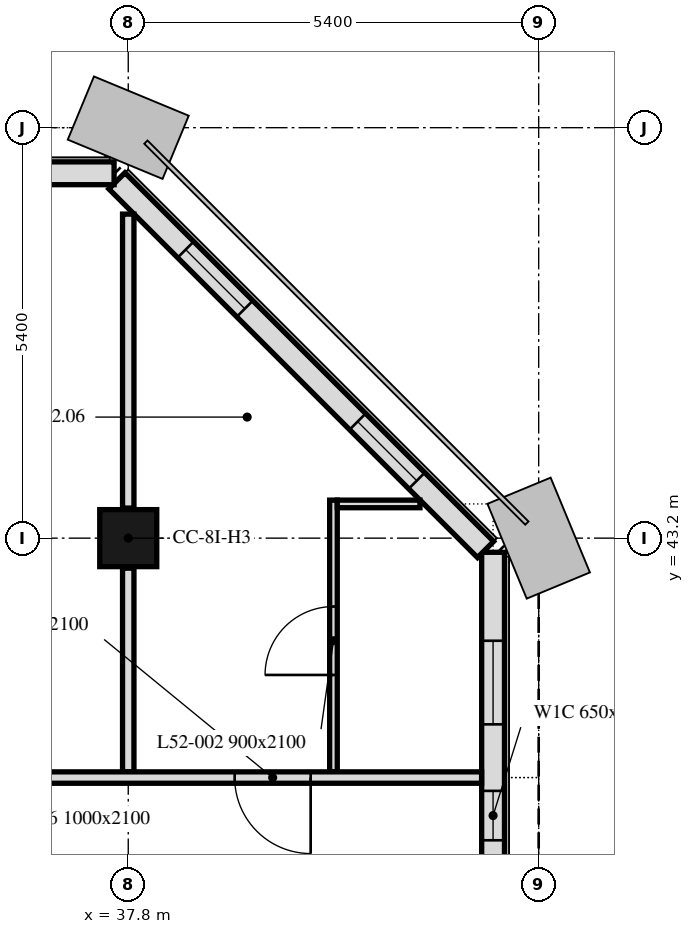
"""IFC4 building model, lengths in metres.
Left out: names, types, materials, properties, quantities, classifications, styles, units other than length and angle.
Written with IfcOpenShell. Run it as: python <this file> out.ifc"""

import sys

from ifc_helpers import new_model, si_unit, direction, frame, frame_2d, origin, origin_2d, place, context, subcontext, project, spatial, rectangle, extrude, element, fill, save


model = new_model("IFC4")
c1 = context("Model", 3, precision=1e-05, world=origin(), true_north=direction((0.0, 1.0)))
c2 = subcontext(c1, "Body", "Model", "MODEL_VIEW")
j1 = project(units=[si_unit("LENGTHUNIT", "METRE"), si_unit("PLANEANGLEUNIT", "RADIAN")], contexts=[c1])
p1 = place(None, origin())
s1 = spatial("IfcSite", under=j1, at=p1, CompositionType="ELEMENT")
p2 = place(p1, origin())
s2 = spatial("IfcBuilding", under=s1, at=p2, CompositionType="ELEMENT")
p3 = place(p2, frame((0.0, 0.0, 210.4)))
s3 = spatial("IfcBuildingStorey", under=s2, at=p3, CompositionType="ELEMENT", Elevation=210.4)
p4 = place(p3, frame((37.8, 43.2, 0.0), z_axis=(0.0, 0.0, 1.0), x_axis=(1.0, 0.0, 0.0)))
e1 = element("IfcColumn", 1, at=p4, inside=s3, PredefinedType="COLUMN", context=c2, shape_type="SweptSolid", body=[
    extrude(rectangle(XDim=0.75, YDim=0.75, at=origin_2d()), origin(), (0.0, 0.0, 1.0), 3.0),
])
p5 = place(p3, frame((42.6, 32.4, 0.0), z_axis=(0.0, 0.0, 1.0), x_axis=(0.0, 1.0, 0.0)))
e2 = element("IfcWall", 2, at=p5, inside=s3, PredefinedType="SOLIDWALL", context=c2, shape_type="SweptSolid", body=[
    extrude(rectangle(XDim=10.614, YDim=0.3, at=frame_2d((5.307, 0.0))), origin(), (0.0, 0.0, 1.0), 3.0),
])
p6 = place(p5, frame((1.35, 0.0, 0.9)))
e3 = element("IfcOpeningElement", 3, at=p6, cuts=e2, PredefinedType="OPENING", context=c2, shape_type="SweptSolid", body=[
    extrude(rectangle(XDim=1.1, YDim=1.7, at=frame_2d((0.55, 0.85))), frame((0.0, 0.16, 0.0), z_axis=(0.0, -1.0, 0.0), x_axis=(1.0, 0.0, 0.0)), (0.0, 0.0, 1.0), 0.32),
])
p7 = place(p5, frame((2.95, 0.0, 0.9)))
e4 = element("IfcOpeningElement", 4, at=p7, cuts=e2, PredefinedType="OPENING", context=c2, shape_type="SweptSolid", body=[
    extrude(rectangle(XDim=1.1, YDim=1.7, at=frame_2d((0.55, 0.85))), frame((0.0, 0.16, 0.0), z_axis=(0.0, -1.0, 0.0), x_axis=(1.0, 0.0, 0.0)), (0.0, 0.0, 1.0), 0.32),
])
p8 = place(p5, frame((6.825, 0.0, 0.9)))
e5 = element("IfcOpeningElement", 5, at=p8, cuts=e2, PredefinedType="OPENING", context=c2, shape_type="SweptSolid", body=[
    extrude(rectangle(XDim=0.65, YDim=1.7, at=frame_2d((0.325, 0.85))), frame((0.0, 0.16, 0.0), z_axis=(0.0, -1.0, 0.0), x_axis=(1.0, 0.0, 0.0)), (0.0, 0.0, 1.0), 0.32),
])
p9 = place(p5, frame((8.35, 0.0, 0.9)))
e6 = element("IfcOpeningElement", 6, at=p9, cuts=e2, PredefinedType="OPENING", context=c2, shape_type="SweptSolid", body=[
    extrude(rectangle(XDim=1.1, YDim=1.7, at=frame_2d((0.55, 0.85))), frame((0.0, 0.16, 0.0), z_axis=(0.0, -1.0, 0.0), x_axis=(1.0, 0.0, 0.0)), (0.0, 0.0, 1.0), 0.32),
])
p10 = place(p3, frame((42.501, 43.051, 0.0), z_axis=(0.0, 0.0, 1.0), x_axis=(-0.707106781187, 0.707106781187, 0.0)))
e7 = element("IfcWall", 7, at=p10, inside=s3, PredefinedType="SOLIDWALL", context=c2, shape_type="SweptSolid", body=[
    extrude(rectangle(XDim=6.86, YDim=0.3, at=frame_2d((3.43, 0.0))), origin(), (0.0, 0.0, 1.0), 3.0),
])
p11 = place(p10, frame((1.28, 0.0, 0.9)))
e8 = element("IfcOpeningElement", 8, at=p11, cuts=e7, PredefinedType="OPENING", context=c2, shape_type="SweptSolid", body=[
    extrude(rectangle(XDim=1.1, YDim=1.7, at=frame_2d((0.55, 0.85))), frame((0.0, 0.16, 0.0), z_axis=(0.0, -1.0, 0.0), x_axis=(1.0, 0.0, 0.0)), (0.0, 0.0, 1.0), 0.32),
])
p12 = place(p10, frame((4.48, 0.0, 0.9)))
e9 = element("IfcOpeningElement", 9, at=p12, cuts=e7, PredefinedType="OPENING", context=c2, shape_type="SweptSolid", body=[
    extrude(rectangle(XDim=1.1, YDim=1.7, at=frame_2d((0.55, 0.85))), frame((0.0, 0.16, 0.0), z_axis=(0.0, -1.0, 0.0), x_axis=(1.0, 0.0, 0.0)), (0.0, 0.0, 1.0), 0.32),
])
p13 = place(p3, frame((37.614, 48.0, 0.0), z_axis=(0.0, 0.0, 1.0), x_axis=(-1.0, 0.0, 0.0)))
e10 = element("IfcWall", 10, at=p13, inside=s3, PredefinedType="SOLIDWALL", context=c2, shape_type="SweptSolid", body=[
    extrude(rectangle(XDim=32.027, YDim=0.3, at=frame_2d((16.014, 0.0))), origin(), (0.0, 0.0, 1.0), 3.0),
])
p14 = place(p13, frame((2.764, 0.0, 0.9)))
e11 = element("IfcOpeningElement", 11, at=p14, cuts=e10, PredefinedType="OPENING", context=c2, shape_type="SweptSolid", body=[
    extrude(rectangle(XDim=1.1, YDim=1.7, at=frame_2d((0.55, 0.85))), frame((0.0, 0.16, 0.0), z_axis=(0.0, -1.0, 0.0), x_axis=(1.0, 0.0, 0.0)), (0.0, 0.0, 1.0), 0.32),
])
p15 = place(p13, frame((6.214, 0.0, 0.9)))
e12 = element("IfcOpeningElement", 12, at=p15, cuts=e10, PredefinedType="OPENING", context=c2, shape_type="SweptSolid", body=[
    extrude(rectangle(XDim=3.4, YDim=1.7, at=frame_2d((1.7, 0.85))), frame((0.0, 0.16, 0.0), z_axis=(0.0, -1.0, 0.0), x_axis=(1.0, 0.0, 0.0)), (0.0, 0.0, 1.0), 0.32),
])
p16 = place(p13, frame((13.564, 0.0, 0.9)))
e13 = element("IfcOpeningElement", 13, at=p16, cuts=e10, PredefinedType="OPENING", context=c2, shape_type="SweptSolid", body=[
    extrude(rectangle(XDim=1.1, YDim=1.7, at=frame_2d((0.55, 0.85))), frame((0.0, 0.16, 0.0), z_axis=(0.0, -1.0, 0.0), x_axis=(1.0, 0.0, 0.0)), (0.0, 0.0, 1.0), 0.32),
])
p17 = place(p13, frame((17.014, 0.0, 0.9)))
e14 = element("IfcOpeningElement", 14, at=p17, cuts=e10, PredefinedType="OPENING", context=c2, shape_type="SweptSolid", body=[
    extrude(rectangle(XDim=3.4, YDim=1.7, at=frame_2d((1.7, 0.85))), frame((0.0, 0.16, 0.0), z_axis=(0.0, -1.0, 0.0), x_axis=(1.0, 0.0, 0.0)), (0.0, 0.0, 1.0), 0.32),
])
p18 = place(p13, frame((24.364, 0.0, 0.9)))
e15 = element("IfcOpeningElement", 15, at=p18, cuts=e10, PredefinedType="OPENING", context=c2, shape_type="SweptSolid", body=[
    extrude(rectangle(XDim=1.1, YDim=1.7, at=frame_2d((0.55, 0.85))), frame((0.0, 0.16, 0.0), z_axis=(0.0, -1.0, 0.0), x_axis=(1.0, 0.0, 0.0)), (0.0, 0.0, 1.0), 0.32),
])
p19 = place(p13, frame((27.814, 0.0, 0.9)))
e16 = element("IfcOpeningElement", 16, at=p19, cuts=e10, PredefinedType="OPENING", context=c2, shape_type="SweptSolid", body=[
    extrude(rectangle(XDim=3.4, YDim=1.7, at=frame_2d((1.7, 0.85))), frame((0.0, 0.16, 0.0), z_axis=(0.0, -1.0, 0.0), x_axis=(1.0, 0.0, 0.0)), (0.0, 0.0, 1.0), 0.32),
])
p20 = place(p3, frame((37.8, 47.463, 0.0), z_axis=(0.0, 0.0, 1.0), x_axis=(0.0, -1.0, 0.0)))
e17 = element("IfcWall", 17, at=p20, inside=s3, PredefinedType="PARTITIONING", context=c2, shape_type="SweptSolid", body=[
    extrude(rectangle(XDim=3.868, YDim=0.15, at=frame_2d((1.934, 0.0))), origin(), (0.0, 0.0, 1.0), 3.0),
])
p21 = place(p3, frame((37.8, 42.805, 0.0), z_axis=(0.0, 0.0, 1.0), x_axis=(0.0, -1.0, 0.0)))
e18 = element("IfcWall", 18, at=p21, inside=s3, PredefinedType="PARTITIONING", context=c2, shape_type="SweptSolid", body=[
    extrude(rectangle(XDim=2.68, YDim=0.15, at=frame_2d((1.34, 0.0))), origin(), (0.0, 0.0, 1.0), 3.0),
])
p22 = place(p3, frame((40.5, 40.125, 0.0), z_axis=(0.0, 0.0, 1.0), x_axis=(0.0, 1.0, 0.0)))
e19 = element("IfcWall", 19, at=p22, inside=s3, PredefinedType="PARTITIONING", context=c2, shape_type="SweptSolid", body=[
    extrude(rectangle(XDim=3.575, YDim=0.1, at=frame_2d((1.788, 0.0))), origin(), (0.0, 0.0, 1.0), 3.0),
])
p23 = place(p22, frame((1.275, 0.0, 0.0)))
e20 = element("IfcOpeningElement", 20, at=p23, cuts=e19, PredefinedType="OPENING", context=c2, shape_type="SweptSolid", body=[
    extrude(rectangle(XDim=0.9, YDim=2.1, at=frame_2d((0.45, 1.05))), frame((0.0, 0.05, 0.0), z_axis=(0.0, -1.0, 0.0), x_axis=(1.0, 0.0, 0.0)), (0.0, 0.0, 1.0), 0.1),
])
p24 = place(p3, frame((40.55, 43.65, 0.0), z_axis=(0.0, 0.0, 1.0), x_axis=(1.0, 0.0, 0.0)))
e21 = element("IfcWall", 21, at=p24, inside=s3, PredefinedType="PARTITIONING", context=c2, shape_type="SweptSolid", body=[
    extrude(rectangle(XDim=1.088, YDim=0.1, at=frame_2d((0.544, 0.0))), origin(), (0.0, 0.0, 1.0), 3.0),
])
p25 = place(p3, frame((42.449, 40.05, 0.0), z_axis=(0.0, 0.0, 1.0), x_axis=(-1.0, 0.0, 0.0)))
e22 = element("IfcWall", 22, at=p25, inside=s3, PredefinedType="PARTITIONING", context=c2, shape_type="SweptSolid", body=[
    extrude(rectangle(XDim=41.698, YDim=0.15, at=frame_2d((20.849, 0.0))), origin(), (0.0, 0.0, 1.0), 2.4),
])
p26 = place(p25, frame((2.249, 0.0, 0.0)))
e23 = element("IfcOpeningElement", 23, at=p26, cuts=e22, PredefinedType="OPENING", context=c2, shape_type="SweptSolid", body=[
    extrude(rectangle(XDim=1.0, YDim=2.1, at=frame_2d((0.5, 1.05))), frame((0.0, 0.075, 0.0), z_axis=(0.0, -1.0, 0.0), x_axis=(1.0, 0.0, 0.0)), (0.0, 0.0, 1.0), 0.15),
])
p27 = place(p25, frame((6.849, 0.0, 0.0)))
e24 = element("IfcOpeningElement", 24, at=p27, cuts=e22, PredefinedType="OPENING", context=c2, shape_type="SweptSolid", body=[
    extrude(rectangle(XDim=1.0, YDim=2.1, at=frame_2d((0.5, 1.05))), frame((0.0, 0.075, 0.0), z_axis=(0.0, -1.0, 0.0), x_axis=(1.0, 0.0, 0.0)), (0.0, 0.0, 1.0), 0.15),
])
p28 = place(p25, frame((18.449, 0.0, 0.0)))
e25 = element("IfcOpeningElement", 25, at=p28, cuts=e22, PredefinedType="OPENING", context=c2, shape_type="SweptSolid", body=[
    extrude(rectangle(XDim=1.0, YDim=2.1, at=frame_2d((0.5, 1.05))), frame((0.0, 0.075, 0.0), z_axis=(0.0, -1.0, 0.0), x_axis=(1.0, 0.0, 0.0)), (0.0, 0.0, 1.0), 0.15),
])
p29 = place(p25, frame((23.049, 0.0, 0.0)))
e26 = element("IfcOpeningElement", 26, at=p29, cuts=e22, PredefinedType="OPENING", context=c2, shape_type="SweptSolid", body=[
    extrude(rectangle(XDim=1.0, YDim=2.1, at=frame_2d((0.5, 1.05))), frame((0.0, 0.075, 0.0), z_axis=(0.0, -1.0, 0.0), x_axis=(1.0, 0.0, 0.0)), (0.0, 0.0, 1.0), 0.15),
])
p30 = place(p25, frame((37.849, 0.0, 0.0)))
e27 = element("IfcOpeningElement", 27, at=p30, cuts=e22, PredefinedType="OPENING", context=c2, shape_type="SweptSolid", body=[
    extrude(rectangle(XDim=1.0, YDim=2.1, at=frame_2d((0.5, 1.05))), frame((0.0, 0.075, 0.0), z_axis=(0.0, -1.0, 0.0), x_axis=(1.0, 0.0, 0.0)), (0.0, 0.0, 1.0), 0.15),
])
p31 = place(p8, origin())
e28 = element("IfcWindow", 28, at=p31, inside=s3, PartitioningType="SINGLE_PANEL", PredefinedType="WINDOW", context=c2, shape_type="SweptSolid", body=[
    extrude(rectangle(XDim=0.65, YDim=1.7, at=frame_2d((0.325, 0.85))), frame((0.0, 0.03, 0.0), z_axis=(0.0, -1.0, 0.0), x_axis=(1.0, 0.0, 0.0)), (0.0, 0.0, 1.0), 0.06),
])
fill(e5, e28)
p32 = place(p9, origin())
e29 = element("IfcWindow", 29, at=p32, inside=s3, PartitioningType="SINGLE_PANEL", PredefinedType="WINDOW", context=c2, shape_type="SweptSolid", body=[
    extrude(rectangle(XDim=1.1, YDim=1.7, at=frame_2d((0.55, 0.85))), frame((0.0, 0.03, 0.0), z_axis=(0.0, -1.0, 0.0), x_axis=(1.0, 0.0, 0.0)), (0.0, 0.0, 1.0), 0.06),
])
fill(e6, e29)
p33 = place(p11, origin())
e30 = element("IfcWindow", 30, at=p33, inside=s3, PartitioningType="SINGLE_PANEL", PredefinedType="WINDOW", context=c2, shape_type="SweptSolid", body=[
    extrude(rectangle(XDim=1.1, YDim=1.7, at=frame_2d((0.55, 0.85))), frame((0.0, 0.03, 0.0), z_axis=(0.0, -1.0, 0.0), x_axis=(1.0, 0.0, 0.0)), (0.0, 0.0, 1.0), 0.06),
])
fill(e8, e30)
p34 = place(p12, origin())
e31 = element("IfcWindow", 31, at=p34, inside=s3, PartitioningType="SINGLE_PANEL", PredefinedType="WINDOW", context=c2, shape_type="SweptSolid", body=[
    extrude(rectangle(XDim=1.1, YDim=1.7, at=frame_2d((0.55, 0.85))), frame((0.0, 0.03, 0.0), z_axis=(0.0, -1.0, 0.0), x_axis=(1.0, 0.0, 0.0)), (0.0, 0.0, 1.0), 0.06),
])
fill(e9, e31)
p35 = place(p23, origin())
e32 = element("IfcDoor", 32, at=p35, inside=s3, OperationType="SINGLE_SWING_LEFT", PredefinedType="DOOR", context=c2, shape_type="SweptSolid", body=[
    extrude(rectangle(XDim=0.9, YDim=2.1, at=frame_2d((0.45, 1.05))), frame((0.0, 0.025, 0.0), z_axis=(0.0, -1.0, 0.0), x_axis=(1.0, 0.0, 0.0)), (0.0, 0.0, 1.0), 0.05),
])
fill(e20, e32)
p36 = place(p26, origin())
e33 = element("IfcDoor", 33, at=p36, inside=s3, OperationType="SINGLE_SWING_LEFT", PredefinedType="DOOR", context=c2, shape_type="SweptSolid", body=[
    extrude(rectangle(XDim=1.0, YDim=2.1, at=frame_2d((0.5, 1.05))), frame((0.0, 0.025, 0.0), z_axis=(0.0, -1.0, 0.0), x_axis=(1.0, 0.0, 0.0)), (0.0, 0.0, 1.0), 0.05),
])
fill(e23, e33)
save(model, sys.argv[1])
